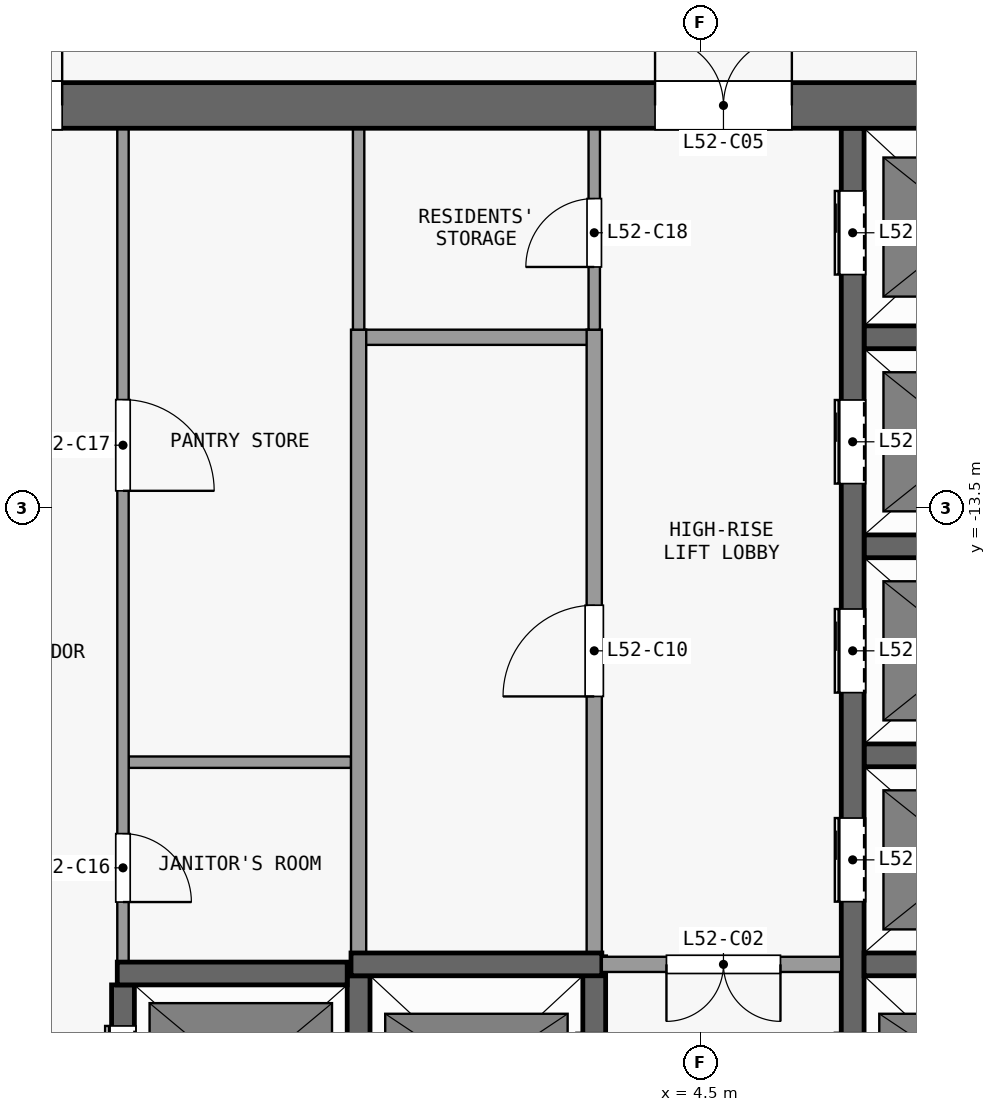
"""IFC4 building model, lengths in metres.
Left out: names, types, materials, properties, quantities, classifications, styles, units other than length and angle.
Written with IfcOpenShell. Run it as: python <this file> out.ifc"""

import sys

from ifc_helpers import new_model, si_unit, direction, frame, frame_2d, origin, place, context, subcontext, project, spatial, rectangle, extrude, element, fill, save


model = new_model("IFC4")
c1 = context("Model", 3, precision=1e-05, world=origin(), true_north=direction((0.0, 1.0)))
c2 = subcontext(c1, "Body", "Model", "MODEL_VIEW")
j1 = project(units=[si_unit("LENGTHUNIT", "METRE"), si_unit("PLANEANGLEUNIT", "RADIAN")], contexts=[c1])
p1 = place(None, origin())
s1 = spatial("IfcSite", under=j1, at=p1, CompositionType="ELEMENT")
p2 = place(p1, origin())
s2 = spatial("IfcBuilding", under=s1, at=p2, CompositionType="ELEMENT")
p3 = place(p2, frame((0.0, 0.0, 208.7)))
s3 = spatial("IfcBuildingStorey", under=s2, at=p3, CompositionType="ELEMENT", Elevation=208.7)
p4 = place(p3, frame((-13.2, -8.2, 0.0), z_axis=(0.0, 0.0, 1.0), x_axis=(1.0, 0.0, 0.0)))
e1 = element("IfcWall", 1, at=p4, inside=s3, PredefinedType="SHEAR", context=c2, shape_type="SweptSolid", body=[
    extrude(rectangle(XDim=26.4, YDim=0.6, at=frame_2d((13.2, 0.0))), origin(), (0.0, 0.0, 1.0), 3.3),
])
p5 = place(p4, frame((7.5, 0.0, 0.0)))
e2 = element("IfcOpeningElement", 2, at=p5, cuts=e1, PredefinedType="OPENING", context=c2, shape_type="SweptSolid", body=[
    extrude(rectangle(XDim=1.8, YDim=2.1, at=frame_2d((0.9, 1.05))), frame((0.0, 0.31, 0.0), z_axis=(0.0, -1.0, 0.0), x_axis=(1.0, 0.0, 0.0)), (0.0, 0.0, 1.0), 0.62),
])
p6 = place(p4, frame((17.1, 0.0, 0.0)))
e3 = element("IfcOpeningElement", 3, at=p6, cuts=e1, PredefinedType="OPENING", context=c2, shape_type="SweptSolid", body=[
    extrude(rectangle(XDim=1.8, YDim=2.1, at=frame_2d((0.9, 1.05))), frame((0.0, 0.31, 0.0), z_axis=(0.0, -1.0, 0.0), x_axis=(1.0, 0.0, 0.0)), (0.0, 0.0, 1.0), 0.62),
])
p7 = place(p4, frame((2.425, 0.0, 0.0)))
e4 = element("IfcOpeningElement", 4, at=p7, cuts=e1, PredefinedType="OPENING", context=c2, shape_type="SweptSolid", body=[
    extrude(rectangle(XDim=0.9, YDim=2.1, at=frame_2d((0.45, 1.05))), frame((0.0, 0.31, 0.0), z_axis=(0.0, -1.0, 0.0), x_axis=(1.0, 0.0, 0.0)), (0.0, 0.0, 1.0), 0.62),
])
p8 = place(p4, frame((23.075, 0.0, 0.0)))
e5 = element("IfcOpeningElement", 5, at=p8, cuts=e1, PredefinedType="OPENING", context=c2, shape_type="SweptSolid", body=[
    extrude(rectangle(XDim=0.9, YDim=2.1, at=frame_2d((0.45, 1.05))), frame((0.0, 0.31, 0.0), z_axis=(0.0, -1.0, 0.0), x_axis=(1.0, 0.0, 0.0)), (0.0, 0.0, 1.0), 0.62),
])
p9 = place(p3, frame((-3.175, -19.62, 0.0), z_axis=(0.0, 0.0, 1.0), x_axis=(1.0, 0.0, 0.0)))
e6 = element("IfcWall", 6, at=p9, inside=s3, PredefinedType="SHEAR", context=c2, shape_type="SweptSolid", body=[
    extrude(rectangle(XDim=3.025, YDim=0.3, at=frame_2d((1.513, 0.0))), origin(), (0.0, 0.0, 1.0), 3.3),
])
p10 = place(p3, frame((-0.1, -19.5, 0.0), z_axis=(0.0, 0.0, 1.0), x_axis=(1.0, 0.0, 0.0)))
e7 = element("IfcWall", 7, at=p10, inside=s3, PredefinedType="SHEAR", context=c2, shape_type="SweptSolid", body=[
    extrude(rectangle(XDim=3.3, YDim=0.3, at=frame_2d((1.65, 0.0))), origin(), (0.0, 0.0, 1.0), 3.3),
])
p11 = place(p3, frame((6.35, -19.5, 0.0), z_axis=(0.0, 0.0, 1.0), x_axis=(-1.0, 0.0, 0.0)))
e8 = element("IfcWall", 8, at=p11, inside=s3, PredefinedType="PARTITIONING", context=c2, shape_type="SweptSolid", body=[
    extrude(rectangle(XDim=3.15, YDim=0.2, at=frame_2d((1.575, 0.0))), origin(), (0.0, 0.0, 1.0), 3.3),
])
p12 = place(p11, frame((0.8, 0.0, 0.0)))
e9 = element("IfcOpeningElement", 9, at=p12, cuts=e8, PredefinedType="OPENING", context=c2, shape_type="SweptSolid", body=[
    extrude(rectangle(XDim=1.5, YDim=2.1, at=frame_2d((0.75, 1.05))), frame((0.0, 0.11, 0.0), z_axis=(0.0, -1.0, 0.0), x_axis=(1.0, 0.0, 0.0)), (0.0, 0.0, 1.0), 0.22),
])
p13 = place(p3, frame((6.65, -19.5, 0.0), z_axis=(0.0, 0.0, 1.0), x_axis=(1.0, 0.0, 0.0)))
e10 = element("IfcWall", 10, at=p13, inside=s3, PredefinedType="SHEAR", context=c2, shape_type="SweptSolid", body=[
    extrude(rectangle(XDim=2.8, YDim=0.3, at=frame_2d((1.4, 0.0))), origin(), (0.0, 0.0, 1.0), 3.3),
])
p14 = place(p3, frame((-3.025, -16.84, 0.0), z_axis=(0.0, 0.0, 1.0), x_axis=(1.0, 0.0, 0.0)))
e11 = element("IfcWall", 11, at=p14, inside=s3, PredefinedType="PARTITIONING", context=c2, shape_type="SweptSolid", body=[
    extrude(rectangle(XDim=2.925, YDim=0.15, at=frame_2d((1.462, 0.0))), origin(), (0.0, 0.0, 1.0), 3.3),
])
for number, where, z_axis, x_axis in (
    (12, (6.65, -16.75, 0.0), (0.0, 0.0, 1.0), (1.0, 0.0, 0.0)),
    (13, (6.65, -14.0, 0.0), (0.0, 0.0, 1.0), (1.0, 0.0, 0.0)),
):
    element("IfcWall", number, at=place(p3, frame(where, z_axis=z_axis, x_axis=x_axis)), inside=s3, PredefinedType="SHEAR", context=c2, shape_type="SweptSolid", body=[
        extrude(rectangle(XDim=2.8, YDim=0.3, at=frame_2d((1.4, 0.0))), origin(), (0.0, 0.0, 1.0), 3.3),
    ])
p15 = place(p3, frame((-0.075, -11.25, 0.0), z_axis=(0.0, 0.0, 1.0), x_axis=(1.0, 0.0, 0.0)))
e14 = element("IfcWall", 14, at=p15, inside=s3, PredefinedType="PARTITIONING", context=c2, shape_type="SweptSolid", body=[
    extrude(rectangle(XDim=3.25, YDim=0.2, at=frame_2d((1.625, 0.0))), origin(), (0.0, 0.0, 1.0), 3.3),
])
p16 = place(p3, frame((6.65, -11.25, 0.0), z_axis=(0.0, 0.0, 1.0), x_axis=(1.0, 0.0, 0.0)))
e15 = element("IfcWall", 15, at=p16, inside=s3, PredefinedType="SHEAR", context=c2, shape_type="SweptSolid", body=[
    extrude(rectangle(XDim=2.8, YDim=0.3, at=frame_2d((1.4, 0.0))), origin(), (0.0, 0.0, 1.0), 3.3),
])
p17 = place(p3, frame((-3.1, -22.25, 0.0), z_axis=(0.0, 0.0, 1.0), x_axis=(0.0, 1.0, 0.0)))
e16 = element("IfcWall", 16, at=p17, inside=s3, PredefinedType="SHEAR", context=c2, shape_type="SweptSolid", body=[
    extrude(rectangle(XDim=2.48, YDim=0.3, at=frame_2d((1.24, 0.0))), origin(), (0.0, 0.0, 1.0), 3.3),
])
p18 = place(p17, frame((0.54, 0.0, 0.0)))
e17 = element("IfcOpeningElement", 17, at=p18, cuts=e16, PredefinedType="OPENING", context=c2, shape_type="SweptSolid", body=[
    extrude(rectangle(XDim=1.4, YDim=2.1, at=frame_2d((0.7, 1.05))), frame((0.0, 0.16, 0.0), z_axis=(0.0, -1.0, 0.0), x_axis=(1.0, 0.0, 0.0)), (0.0, 0.0, 1.0), 0.32),
])
p19 = place(p3, frame((-3.1, -8.5, 0.0), z_axis=(0.0, 0.0, 1.0), x_axis=(0.0, -1.0, 0.0)))
e18 = element("IfcWall", 18, at=p19, inside=s3, PredefinedType="PARTITIONING", context=c2, shape_type="SweptSolid", body=[
    extrude(rectangle(XDim=10.97, YDim=0.15, at=frame_2d((5.485, 0.0))), origin(), (0.0, 0.0, 1.0), 3.3),
])
p20 = place(p19, frame((9.28, 0.0, 0.0)))
e19 = element("IfcOpeningElement", 19, at=p20, cuts=e18, PredefinedType="OPENING", context=c2, shape_type="SweptSolid", body=[
    extrude(rectangle(XDim=0.9, YDim=2.1, at=frame_2d((0.45, 1.05))), frame((0.0, 0.085, 0.0), z_axis=(0.0, -1.0, 0.0), x_axis=(1.0, 0.0, 0.0)), (0.0, 0.0, 1.0), 0.17),
])
p21 = place(p19, frame((3.57, 0.0, 0.0)))
e20 = element("IfcOpeningElement", 20, at=p21, cuts=e18, PredefinedType="OPENING", context=c2, shape_type="SweptSolid", body=[
    extrude(rectangle(XDim=1.2, YDim=2.1, at=frame_2d((0.6, 1.05))), frame((0.0, 0.085, 0.0), z_axis=(0.0, -1.0, 0.0), x_axis=(1.0, 0.0, 0.0)), (0.0, 0.0, 1.0), 0.17),
])
p22 = place(p3, frame((0.0, -22.25, 0.0), z_axis=(0.0, 0.0, 1.0), x_axis=(0.0, 1.0, 0.0)))
e21 = element("IfcWall", 21, at=p22, inside=s3, PredefinedType="SHEAR", context=c2, shape_type="SweptSolid", body=[
    extrude(rectangle(XDim=2.6, YDim=0.3, at=frame_2d((1.3, 0.0))), origin(), (0.0, 0.0, 1.0), 3.3),
])
p23 = place(p3, frame((0.0, -19.35, 0.0), z_axis=(0.0, 0.0, 1.0), x_axis=(0.0, 1.0, 0.0)))
e22 = element("IfcWall", 22, at=p23, inside=s3, PredefinedType="PARTITIONING", context=c2, shape_type="SweptSolid", body=[
    extrude(rectangle(XDim=8.2, YDim=0.2, at=frame_2d((4.1, 0.0))), origin(), (0.0, 0.0, 1.0), 3.3),
])
p24 = place(p3, frame((0.0, -11.15, 0.0), z_axis=(0.0, 0.0, 1.0), x_axis=(0.0, 1.0, 0.0)))
e23 = element("IfcWall", 23, at=p24, inside=s3, PredefinedType="PARTITIONING", context=c2, shape_type="SweptSolid", body=[
    extrude(rectangle(XDim=2.65, YDim=0.15, at=frame_2d((1.325, 0.0))), origin(), (0.0, 0.0, 1.0), 3.3),
])
p25 = place(p3, frame((3.1, -22.25, 0.0), z_axis=(0.0, 0.0, 1.0), x_axis=(0.0, 1.0, 0.0)))
e24 = element("IfcWall", 24, at=p25, inside=s3, PredefinedType="SHEAR", context=c2, shape_type="SweptSolid", body=[
    extrude(rectangle(XDim=2.85, YDim=0.3, at=frame_2d((1.425, 0.0))), origin(), (0.0, 0.0, 1.0), 3.3),
])
p26 = place(p25, frame((0.75, 0.0, 0.0)))
e25 = element("IfcOpeningElement", 25, at=p26, cuts=e24, PredefinedType="OPENING", context=c2, shape_type="SweptSolid", body=[
    extrude(rectangle(XDim=1.1, YDim=2.1, at=frame_2d((0.55, 1.05))), frame((0.0, 0.16, 0.0), z_axis=(0.0, -1.0, 0.0), x_axis=(1.0, 0.0, 0.0)), (0.0, 0.0, 1.0), 0.32),
])
p27 = place(p3, frame((3.1, -19.6, 0.0), z_axis=(0.0, 0.0, 1.0), x_axis=(0.0, 1.0, 0.0)))
e26 = element("IfcWall", 26, at=p27, inside=s3, PredefinedType="PARTITIONING", context=c2, shape_type="SweptSolid", body=[
    extrude(rectangle(XDim=8.45, YDim=0.2, at=frame_2d((4.225, 0.0))), origin(), (0.0, 0.0, 1.0), 3.3),
])
p28 = place(p27, frame((3.625, 0.0, 0.0)))
e27 = element("IfcOpeningElement", 27, at=p28, cuts=e26, PredefinedType="OPENING", context=c2, shape_type="SweptSolid", body=[
    extrude(rectangle(XDim=1.2, YDim=2.1, at=frame_2d((0.6, 1.05))), frame((0.0, 0.11, 0.0), z_axis=(0.0, -1.0, 0.0), x_axis=(1.0, 0.0, 0.0)), (0.0, 0.0, 1.0), 0.22),
])
p29 = place(p3, frame((3.1, -11.15, 0.0), z_axis=(0.0, 0.0, 1.0), x_axis=(0.0, 1.0, 0.0)))
e28 = element("IfcWall", 28, at=p29, inside=s3, PredefinedType="PARTITIONING", context=c2, shape_type="SweptSolid", body=[
    extrude(rectangle(XDim=2.65, YDim=0.15, at=frame_2d((1.325, 0.0))), origin(), (0.0, 0.0, 1.0), 3.3),
])
p30 = place(p29, frame((0.825, 0.0, 0.0)))
e29 = element("IfcOpeningElement", 29, at=p30, cuts=e28, PredefinedType="OPENING", context=c2, shape_type="SweptSolid", body=[
    extrude(rectangle(XDim=0.9, YDim=2.1, at=frame_2d((0.45, 1.05))), frame((0.0, 0.085, 0.0), z_axis=(0.0, -1.0, 0.0), x_axis=(1.0, 0.0, 0.0)), (0.0, 0.0, 1.0), 0.17),
])
p31 = place(p3, frame((6.5, -22.55, 0.0), z_axis=(0.0, 0.0, 1.0), x_axis=(0.0, 1.0, 0.0)))
e30 = element("IfcWall", 30, at=p31, inside=s3, PredefinedType="SHEAR", context=c2, shape_type="SweptSolid", body=[
    extrude(rectangle(XDim=14.05, YDim=0.3, at=frame_2d((7.025, 0.0))), origin(), (0.0, 0.0, 1.0), 3.3),
])
p32 = place(p31, frame((1.05, 0.0, 0.0)))
e31 = element("IfcOpeningElement", 31, at=p32, cuts=e30, PredefinedType="OPENING", context=c2, shape_type="SweptSolid", body=[
    extrude(rectangle(XDim=1.1, YDim=2.1, at=frame_2d((0.55, 1.05))), frame((0.0, 0.16, 0.0), z_axis=(0.0, -1.0, 0.0), x_axis=(1.0, 0.0, 0.0)), (0.0, 0.0, 1.0), 0.32),
])
p33 = place(p31, frame((3.875, 0.0, 0.0)))
e32 = element("IfcOpeningElement", 32, at=p33, cuts=e30, PredefinedType="OPENING", context=c2, shape_type="SweptSolid", body=[
    extrude(rectangle(XDim=1.1, YDim=2.1, at=frame_2d((0.55, 1.05))), frame((0.0, 0.16, 0.0), z_axis=(0.0, -1.0, 0.0), x_axis=(1.0, 0.0, 0.0)), (0.0, 0.0, 1.0), 0.32),
])
p34 = place(p31, frame((6.625, 0.0, 0.0)))
e33 = element("IfcOpeningElement", 33, at=p34, cuts=e30, PredefinedType="OPENING", context=c2, shape_type="SweptSolid", body=[
    extrude(rectangle(XDim=1.1, YDim=2.1, at=frame_2d((0.55, 1.05))), frame((0.0, 0.16, 0.0), z_axis=(0.0, -1.0, 0.0), x_axis=(1.0, 0.0, 0.0)), (0.0, 0.0, 1.0), 0.32),
])
p35 = place(p31, frame((9.375, 0.0, 0.0)))
e34 = element("IfcOpeningElement", 34, at=p35, cuts=e30, PredefinedType="OPENING", context=c2, shape_type="SweptSolid", body=[
    extrude(rectangle(XDim=1.1, YDim=2.1, at=frame_2d((0.55, 1.05))), frame((0.0, 0.16, 0.0), z_axis=(0.0, -1.0, 0.0), x_axis=(1.0, 0.0, 0.0)), (0.0, 0.0, 1.0), 0.32),
])
p36 = place(p31, frame((12.125, 0.0, 0.0)))
e35 = element("IfcOpeningElement", 35, at=p36, cuts=e30, PredefinedType="OPENING", context=c2, shape_type="SweptSolid", body=[
    extrude(rectangle(XDim=1.1, YDim=2.1, at=frame_2d((0.55, 1.05))), frame((0.0, 0.16, 0.0), z_axis=(0.0, -1.0, 0.0), x_axis=(1.0, 0.0, 0.0)), (0.0, 0.0, 1.0), 0.32),
])
p37 = place(p33, origin())
e36 = element("IfcDoor", 36, at=p37, inside=s3, OperationType="DOUBLE_DOOR_SLIDING", PredefinedType="DOOR", context=c2, shape_type="SweptSolid", body=[
    extrude(rectangle(XDim=1.1, YDim=2.1, at=frame_2d((0.55, 1.05))), frame((0.0, 0.025, 0.0), z_axis=(0.0, -1.0, 0.0), x_axis=(1.0, 0.0, 0.0)), (0.0, 0.0, 1.0), 0.05),
])
fill(e32, e36)
p38 = place(p34, origin())
e37 = element("IfcDoor", 37, at=p38, inside=s3, OperationType="DOUBLE_DOOR_SLIDING", PredefinedType="DOOR", context=c2, shape_type="SweptSolid", body=[
    extrude(rectangle(XDim=1.1, YDim=2.1, at=frame_2d((0.55, 1.05))), frame((0.0, 0.025, 0.0), z_axis=(0.0, -1.0, 0.0), x_axis=(1.0, 0.0, 0.0)), (0.0, 0.0, 1.0), 0.05),
])
fill(e33, e37)
p39 = place(p35, origin())
e38 = element("IfcDoor", 38, at=p39, inside=s3, OperationType="DOUBLE_DOOR_SLIDING", PredefinedType="DOOR", context=c2, shape_type="SweptSolid", body=[
    extrude(rectangle(XDim=1.1, YDim=2.1, at=frame_2d((0.55, 1.05))), frame((0.0, 0.025, 0.0), z_axis=(0.0, -1.0, 0.0), x_axis=(1.0, 0.0, 0.0)), (0.0, 0.0, 1.0), 0.05),
])
fill(e34, e38)
p40 = place(p36, origin())
e39 = element("IfcDoor", 39, at=p40, inside=s3, OperationType="DOUBLE_DOOR_SLIDING", PredefinedType="DOOR", context=c2, shape_type="SweptSolid", body=[
    extrude(rectangle(XDim=1.1, YDim=2.1, at=frame_2d((0.55, 1.05))), frame((0.0, 0.025, 0.0), z_axis=(0.0, -1.0, 0.0), x_axis=(1.0, 0.0, 0.0)), (0.0, 0.0, 1.0), 0.05),
])
fill(e35, e39)
p41 = place(p18, origin())
e40 = element("IfcDoor", 40, at=p41, inside=s3, OperationType="DOUBLE_DOOR_SLIDING", PredefinedType="DOOR", context=c2, shape_type="SweptSolid", body=[
    extrude(rectangle(XDim=1.4, YDim=2.1, at=frame_2d((0.7, 1.05))), frame((0.0, 0.025, 0.0), z_axis=(0.0, -1.0, 0.0), x_axis=(1.0, 0.0, 0.0)), (0.0, 0.0, 1.0), 0.05),
])
fill(e17, e40)
p42 = place(p12, origin())
e41 = element("IfcDoor", 41, at=p42, inside=s3, OperationType="DOUBLE_DOOR_SINGLE_SWING", PredefinedType="DOOR", context=c2, shape_type="SweptSolid", body=[
    extrude(rectangle(XDim=1.5, YDim=2.1, at=frame_2d((0.75, 1.05))), frame((0.0, 0.025, 0.0), z_axis=(0.0, -1.0, 0.0), x_axis=(1.0, 0.0, 0.0)), (0.0, 0.0, 1.0), 0.05),
])
fill(e9, e41)
p43 = place(p5, origin())
e42 = element("IfcDoor", 42, at=p43, inside=s3, OperationType="DOUBLE_DOOR_SINGLE_SWING", PredefinedType="DOOR", context=c2, shape_type="SweptSolid", body=[
    extrude(rectangle(XDim=1.8, YDim=2.1, at=frame_2d((0.9, 1.05))), frame((0.0, 0.025, 0.0), z_axis=(0.0, -1.0, 0.0), x_axis=(1.0, 0.0, 0.0)), (0.0, 0.0, 1.0), 0.05),
])
fill(e2, e42)
p44 = place(p6, origin())
e43 = element("IfcDoor", 43, at=p44, inside=s3, OperationType="DOUBLE_DOOR_SINGLE_SWING", PredefinedType="DOOR", context=c2, shape_type="SweptSolid", body=[
    extrude(rectangle(XDim=1.8, YDim=2.1, at=frame_2d((0.9, 1.05))), frame((0.0, 0.025, 0.0), z_axis=(0.0, -1.0, 0.0), x_axis=(1.0, 0.0, 0.0)), (0.0, 0.0, 1.0), 0.05),
])
fill(e3, e43)
p45 = place(p28, origin())
e44 = element("IfcDoor", 44, at=p45, inside=s3, OperationType="SINGLE_SWING_LEFT", PredefinedType="DOOR", context=c2, shape_type="SweptSolid", body=[
    extrude(rectangle(XDim=1.2, YDim=2.1, at=frame_2d((0.6, 1.05))), frame((0.0, 0.025, 0.0), z_axis=(0.0, -1.0, 0.0), x_axis=(1.0, 0.0, 0.0)), (0.0, 0.0, 1.0), 0.05),
])
fill(e27, e44)
p46 = place(p20, origin())
e45 = element("IfcDoor", 45, at=p46, inside=s3, OperationType="SINGLE_SWING_RIGHT", PredefinedType="DOOR", context=c2, shape_type="SweptSolid", body=[
    extrude(rectangle(XDim=0.9, YDim=2.1, at=frame_2d((0.45, 1.05))), frame((0.0, 0.025, 0.0), z_axis=(0.0, -1.0, 0.0), x_axis=(1.0, 0.0, 0.0)), (0.0, 0.0, 1.0), 0.05),
])
fill(e19, e45)
p47 = place(p21, origin())
e46 = element("IfcDoor", 46, at=p47, inside=s3, OperationType="SINGLE_SWING_RIGHT", PredefinedType="DOOR", context=c2, shape_type="SweptSolid", body=[
    extrude(rectangle(XDim=1.2, YDim=2.1, at=frame_2d((0.6, 1.05))), frame((0.0, 0.025, 0.0), z_axis=(0.0, -1.0, 0.0), x_axis=(1.0, 0.0, 0.0)), (0.0, 0.0, 1.0), 0.05),
])
fill(e20, e46)
p48 = place(p30, origin())
e47 = element("IfcDoor", 47, at=p48, inside=s3, OperationType="SINGLE_SWING_LEFT", PredefinedType="DOOR", context=c2, shape_type="SweptSolid", body=[
    extrude(rectangle(XDim=0.9, YDim=2.1, at=frame_2d((0.45, 1.05))), frame((0.0, 0.025, 0.0), z_axis=(0.0, -1.0, 0.0), x_axis=(1.0, 0.0, 0.0)), (0.0, 0.0, 1.0), 0.05),
])
fill(e29, e47)
save(model, sys.argv[1])
